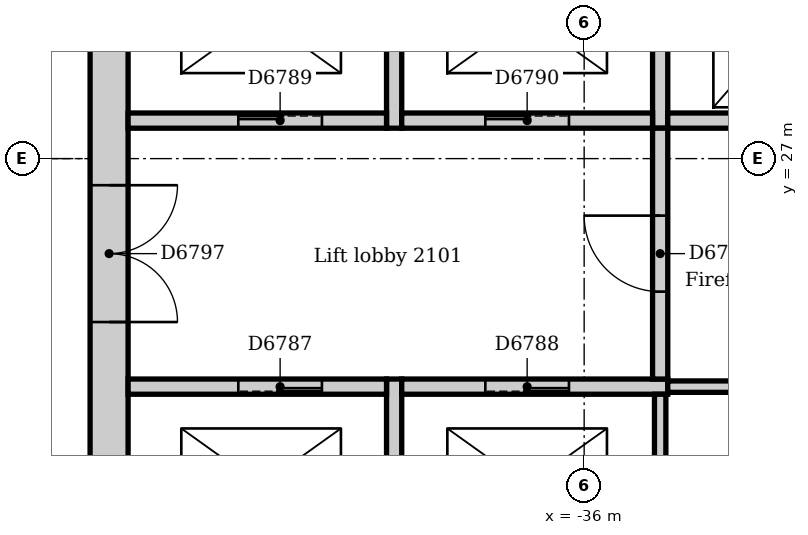
"""IFC4 building model, lengths in metres.
Left out: names, types, materials, properties, quantities, classifications, styles, units other than length and angle.
Written with IfcOpenShell. Run it as: python <this file> out.ifc"""

import sys

from ifc_helpers import new_model, si_unit, direction, frame, frame_2d, origin, place, context, subcontext, project, spatial, rectangle, extrude, element, fill, save


model = new_model("IFC4")
c1 = context("Model", 3, precision=1e-05, world=origin(), true_north=direction((0.0, 1.0)))
c2 = subcontext(c1, "Body", "Model", "MODEL_VIEW")
j1 = project(units=[si_unit("LENGTHUNIT", "METRE"), si_unit("PLANEANGLEUNIT", "RADIAN")], contexts=[c1])
p1 = place(None, origin())
s1 = spatial("IfcSite", under=j1, at=p1, CompositionType="ELEMENT")
p2 = place(p1, origin())
s2 = spatial("IfcBuilding", under=s1, at=p2, CompositionType="ELEMENT")
p3 = place(p2, frame((0.0, 0.0, 91.0)))
s3 = spatial("IfcBuildingStorey", under=s2, at=p3, CompositionType="ELEMENT", Elevation=91.0)
p4 = place(p3, frame((-42.25, 30.5, 0.0), z_axis=(0.0, 0.0, 1.0), x_axis=(0.0, -1.0, 0.0)))
e1 = element("IfcWall", 1, at=p4, inside=s3, PredefinedType="SOLIDWALL", context=c2, shape_type="SweptSolid", body=[
    extrude(rectangle(XDim=9.5, YDim=0.5, at=frame_2d((4.75, 0.0))), origin(), (0.0, 0.0, 1.0), 4.0),
])
p5 = place(p4, frame((3.85, 0.0, 0.0)))
e2 = element("IfcOpeningElement", 2, at=p5, cuts=e1, PredefinedType="OPENING", context=c2, shape_type="SweptSolid", body=[
    extrude(rectangle(XDim=1.8, YDim=2.1, at=frame_2d((0.9, 1.05))), frame((0.0, 0.26, 0.0), z_axis=(0.0, -1.0, 0.0), x_axis=(1.0, 0.0, 0.0)), (0.0, 0.0, 1.0), 0.52),
])
p6 = place(p3, frame((-38.5, 21.0, 0.0), z_axis=(0.0, 0.0, 1.0), x_axis=(0.0, 1.0, 0.0)))
e3 = element("IfcWall", 3, at=p6, inside=s3, PredefinedType="SOLIDWALL", context=c2, shape_type="SweptSolid", body=[
    extrude(rectangle(XDim=3.1, YDim=0.2, at=frame_2d((1.55, 0.0))), origin(), (0.0, 0.0, 1.0), 4.0),
])
p7 = place(p3, frame((-38.6, 24.0, 0.0), z_axis=(0.0, 0.0, 1.0), x_axis=(-1.0, 0.0, 0.0)))
e4 = element("IfcWall", 4, at=p7, inside=s3, PredefinedType="SOLIDWALL", context=c2, shape_type="SweptSolid", body=[
    extrude(rectangle(XDim=3.4, YDim=0.2, at=frame_2d((1.7, 0.0))), origin(), (0.0, 0.0, 1.0), 4.0),
])
p8 = place(p7, frame((0.85, 0.0, 0.0)))
e5 = element("IfcOpeningElement", 5, at=p8, cuts=e4, PredefinedType="OPENING", context=c2, shape_type="SweptSolid", body=[
    extrude(rectangle(XDim=1.1, YDim=2.1, at=frame_2d((0.55, 1.05))), frame((0.0, 0.11, 0.0), z_axis=(0.0, -1.0, 0.0), x_axis=(1.0, 0.0, 0.0)), (0.0, 0.0, 1.0), 0.22),
])
p9 = place(p3, frame((-34.9, 24.0, 0.0), z_axis=(0.0, 0.0, 1.0), x_axis=(-1.0, 0.0, 0.0)))
e6 = element("IfcWall", 6, at=p9, inside=s3, PredefinedType="SOLIDWALL", context=c2, shape_type="SweptSolid", body=[
    extrude(rectangle(XDim=3.5, YDim=0.2, at=frame_2d((1.75, 0.0))), origin(), (0.0, 0.0, 1.0), 4.0),
])
p10 = place(p9, frame((1.3, 0.0, 0.0)))
e7 = element("IfcOpeningElement", 7, at=p10, cuts=e6, PredefinedType="OPENING", context=c2, shape_type="SweptSolid", body=[
    extrude(rectangle(XDim=1.1, YDim=2.1, at=frame_2d((0.55, 1.05))), frame((0.0, 0.11, 0.0), z_axis=(0.0, -1.0, 0.0), x_axis=(1.0, 0.0, 0.0)), (0.0, 0.0, 1.0), 0.22),
])
p11 = place(p3, frame((-38.5, 27.4, 0.0), z_axis=(0.0, 0.0, 1.0), x_axis=(0.0, 1.0, 0.0)))
e8 = element("IfcWall", 8, at=p11, inside=s3, PredefinedType="SOLIDWALL", context=c2, shape_type="SweptSolid", body=[
    extrude(rectangle(XDim=2.85, YDim=0.2, at=frame_2d((1.425, 0.0))), origin(), (0.0, 0.0, 1.0), 4.0),
])
p12 = place(p3, frame((-42.0, 27.5, 0.0), z_axis=(0.0, 0.0, 1.0), x_axis=(1.0, 0.0, 0.0)))
e9 = element("IfcWall", 9, at=p12, inside=s3, PredefinedType="SOLIDWALL", context=c2, shape_type="SweptSolid", body=[
    extrude(rectangle(XDim=3.4, YDim=0.2, at=frame_2d((1.7, 0.0))), origin(), (0.0, 0.0, 1.0), 4.0),
])
p13 = place(p12, frame((1.45, 0.0, 0.0)))
e10 = element("IfcOpeningElement", 10, at=p13, cuts=e9, PredefinedType="OPENING", context=c2, shape_type="SweptSolid", body=[
    extrude(rectangle(XDim=1.1, YDim=2.1, at=frame_2d((0.55, 1.05))), frame((0.0, 0.11, 0.0), z_axis=(0.0, -1.0, 0.0), x_axis=(1.0, 0.0, 0.0)), (0.0, 0.0, 1.0), 0.22),
])
p14 = place(p3, frame((-35.0, 27.4, 0.0), z_axis=(0.0, 0.0, 1.0), x_axis=(0.0, 1.0, 0.0)))
e11 = element("IfcWall", 11, at=p14, inside=s3, PredefinedType="SOLIDWALL", context=c2, shape_type="SweptSolid", body=[
    extrude(rectangle(XDim=2.85, YDim=0.2, at=frame_2d((1.425, 0.0))), origin(), (0.0, 0.0, 1.0), 4.0),
])
p15 = place(p3, frame((-38.4, 27.5, 0.0), z_axis=(0.0, 0.0, 1.0), x_axis=(1.0, 0.0, 0.0)))
e12 = element("IfcWall", 12, at=p15, inside=s3, PredefinedType="SOLIDWALL", context=c2, shape_type="SweptSolid", body=[
    extrude(rectangle(XDim=3.3, YDim=0.2, at=frame_2d((1.65, 0.0))), origin(), (0.0, 0.0, 1.0), 4.0),
])
p16 = place(p15, frame((1.1, 0.0, 0.0)))
e13 = element("IfcOpeningElement", 13, at=p16, cuts=e12, PredefinedType="OPENING", context=c2, shape_type="SweptSolid", body=[
    extrude(rectangle(XDim=1.1, YDim=2.1, at=frame_2d((0.55, 1.05))), frame((0.0, 0.11, 0.0), z_axis=(0.0, -1.0, 0.0), x_axis=(1.0, 0.0, 0.0)), (0.0, 0.0, 1.0), 0.22),
])
p17 = place(p3, frame((-34.9, 27.5, 0.0), z_axis=(0.0, 0.0, 1.0), x_axis=(1.0, 0.0, 0.0)))
e14 = element("IfcWall", 14, at=p17, inside=s3, PredefinedType="SOLIDWALL", context=c2, shape_type="SweptSolid", body=[
    extrude(rectangle(XDim=3.4, YDim=0.2, at=frame_2d((1.7, 0.0))), origin(), (0.0, 0.0, 1.0), 4.0),
])
p18 = place(p17, frame((1.1, 0.0, 0.0)))
e15 = element("IfcOpeningElement", 15, at=p18, cuts=e14, PredefinedType="OPENING", context=c2, shape_type="SweptSolid", body=[
    extrude(rectangle(XDim=1.1, YDim=2.1, at=frame_2d((0.55, 1.05))), frame((0.0, 0.11, 0.0), z_axis=(0.0, -1.0, 0.0), x_axis=(1.0, 0.0, 0.0)), (0.0, 0.0, 1.0), 0.22),
])
p19 = place(p3, frame((-35.0, 24.1, 0.0), z_axis=(0.0, 0.0, 1.0), x_axis=(0.0, 1.0, 0.0)))
e16 = element("IfcWall", 16, at=p19, inside=s3, PredefinedType="SOLIDWALL", context=c2, shape_type="SweptSolid", body=[
    extrude(rectangle(XDim=3.3, YDim=0.2, at=frame_2d((1.65, 0.0))), origin(), (0.0, 0.0, 1.0), 4.0),
])
p20 = place(p19, frame((1.15, 0.0, 0.0)))
e17 = element("IfcOpeningElement", 17, at=p20, cuts=e16, PredefinedType="OPENING", context=c2, shape_type="SweptSolid", body=[
    extrude(rectangle(XDim=1.0, YDim=2.1, at=frame_2d((0.5, 1.05))), frame((0.0, 0.11, 0.0), z_axis=(0.0, -1.0, 0.0), x_axis=(1.0, 0.0, 0.0)), (0.0, 0.0, 1.0), 0.22),
])
p21 = place(p3, frame((-35.0, 21.0, 0.0), z_axis=(0.0, 0.0, 1.0), x_axis=(0.0, 1.0, 0.0)))
e18 = element("IfcWall", 18, at=p21, inside=s3, PredefinedType="SOLIDWALL", context=c2, shape_type="SweptSolid", body=[
    extrude(rectangle(XDim=2.9, YDim=0.15, at=frame_2d((1.45, 0.0))), origin(), (0.0, 0.0, 1.0), 4.0),
])
p22 = place(p3, frame((-31.5, 24.0, 0.0), z_axis=(0.0, 0.0, 1.0), x_axis=(-1.0, 0.0, 0.0)))
e19 = element("IfcWall", 19, at=p22, inside=s3, PredefinedType="SOLIDWALL", context=c2, shape_type="SweptSolid", body=[
    extrude(rectangle(XDim=3.4, YDim=0.15, at=frame_2d((1.7, 0.0))), origin(), (0.0, 0.0, 1.0), 4.0),
])
p23 = place(p8, origin())
e20 = element("IfcDoor", 20, at=p23, inside=s3, OperationType="SLIDING_TO_LEFT", PredefinedType="DOOR", context=c2, shape_type="SweptSolid", body=[
    extrude(rectangle(XDim=1.1, YDim=2.1, at=frame_2d((0.55, 1.05))), frame((0.0, 0.025, 0.0), z_axis=(0.0, -1.0, 0.0), x_axis=(1.0, 0.0, 0.0)), (0.0, 0.0, 1.0), 0.05),
])
fill(e5, e20)
p24 = place(p10, origin())
e21 = element("IfcDoor", 21, at=p24, inside=s3, OperationType="SLIDING_TO_LEFT", PredefinedType="DOOR", context=c2, shape_type="SweptSolid", body=[
    extrude(rectangle(XDim=1.1, YDim=2.1, at=frame_2d((0.55, 1.05))), frame((0.0, 0.025, 0.0), z_axis=(0.0, -1.0, 0.0), x_axis=(1.0, 0.0, 0.0)), (0.0, 0.0, 1.0), 0.05),
])
fill(e7, e21)
p25 = place(p13, origin())
e22 = element("IfcDoor", 22, at=p25, inside=s3, OperationType="SLIDING_TO_LEFT", PredefinedType="DOOR", context=c2, shape_type="SweptSolid", body=[
    extrude(rectangle(XDim=1.1, YDim=2.1, at=frame_2d((0.55, 1.05))), frame((0.0, 0.025, 0.0), z_axis=(0.0, -1.0, 0.0), x_axis=(1.0, 0.0, 0.0)), (0.0, 0.0, 1.0), 0.05),
])
fill(e10, e22)
p26 = place(p16, origin())
e23 = element("IfcDoor", 23, at=p26, inside=s3, OperationType="SLIDING_TO_LEFT", PredefinedType="DOOR", context=c2, shape_type="SweptSolid", body=[
    extrude(rectangle(XDim=1.1, YDim=2.1, at=frame_2d((0.55, 1.05))), frame((0.0, 0.025, 0.0), z_axis=(0.0, -1.0, 0.0), x_axis=(1.0, 0.0, 0.0)), (0.0, 0.0, 1.0), 0.05),
])
fill(e13, e23)
p27 = place(p20, origin())
e24 = element("IfcDoor", 24, at=p27, inside=s3, OperationType="SINGLE_SWING_RIGHT", PredefinedType="DOOR", context=c2, shape_type="SweptSolid", body=[
    extrude(rectangle(XDim=1.0, YDim=2.1, at=frame_2d((0.5, 1.05))), frame((0.0, 0.025, 0.0), z_axis=(0.0, -1.0, 0.0), x_axis=(1.0, 0.0, 0.0)), (0.0, 0.0, 1.0), 0.05),
])
fill(e17, e24)
p28 = place(p5, origin())
e25 = element("IfcDoor", 25, at=p28, inside=s3, OperationType="DOUBLE_DOOR_SINGLE_SWING", PredefinedType="DOOR", context=c2, shape_type="SweptSolid", body=[
    extrude(rectangle(XDim=1.8, YDim=2.1, at=frame_2d((0.9, 1.05))), frame((0.0, 0.025, 0.0), z_axis=(0.0, -1.0, 0.0), x_axis=(1.0, 0.0, 0.0)), (0.0, 0.0, 1.0), 0.05),
])
fill(e2, e25)
save(model, sys.argv[1])
